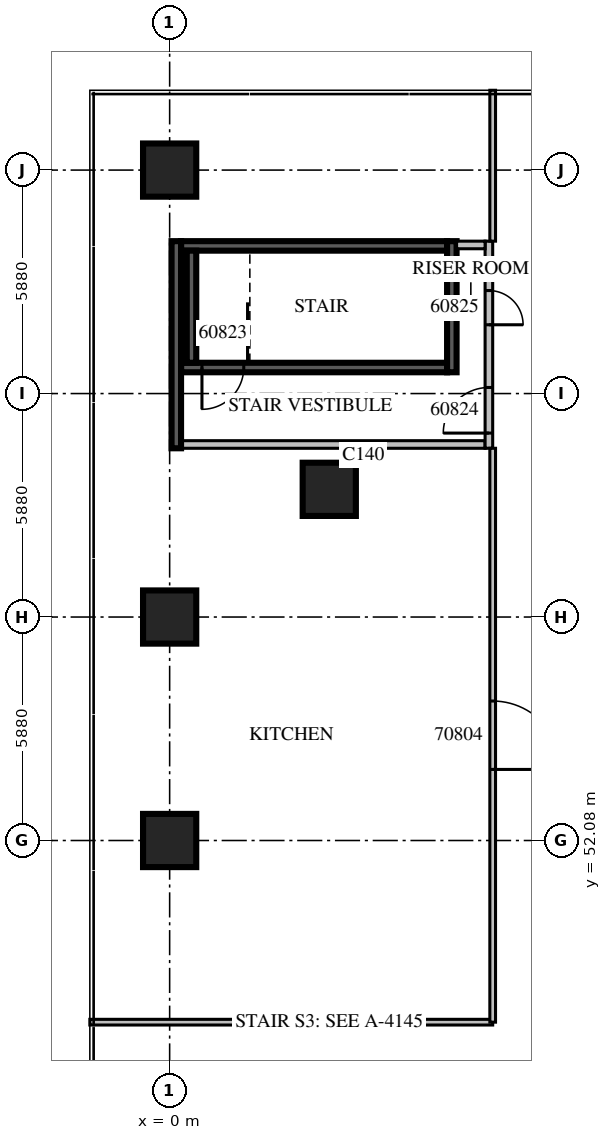
"""IFC4 building model, lengths in metres.
Left out: names, types, materials, properties, quantities, classifications, styles, units other than length and angle.
Written with IfcOpenShell. Run it as: python <this file> out.ifc"""

import sys

from ifc_helpers import new_model, si_unit, direction, frame, frame_2d, origin, origin_2d, place, context, subcontext, project, spatial, rectangle, extrude, source, transform, mapped, element, fill, save


model = new_model("IFC4")
c1 = context("Model", 3, precision=1e-05, world=origin(), true_north=direction((0.0, 1.0)))
c2 = subcontext(c1, "Body", "Model", "MODEL_VIEW")
j1 = project(units=[si_unit("LENGTHUNIT", "METRE"), si_unit("PLANEANGLEUNIT", "RADIAN")], contexts=[c1])
p1 = place(None, origin())
s1 = spatial("IfcSite", under=j1, at=p1, CompositionType="ELEMENT")
p2 = place(p1, origin())
s2 = spatial("IfcBuilding", under=s1, at=p2, CompositionType="ELEMENT")
p3 = place(p2, frame((0.0, 0.0, 29.1)))
s3 = spatial("IfcBuildingStorey", under=s2, at=p3, CompositionType="ELEMENT", Elevation=29.1)
m1 = source(origin(), c2, "Body", "SweptSolid", [
    extrude(rectangle(XDim=1.4, YDim=1.4, at=origin_2d()), origin(), (0.0, 0.0, 1.0), 5.4),
])
for number, where, z_axis, x_axis in (
    (1, (0.0, 52.08, 0.0), (0.0, 0.0, 1.0), (1.0, 0.0, 0.0)),
    (2, (0.0, 57.96, 0.0), (0.0, 0.0, 1.0), (1.0, 0.0, 0.0)),
    (3, (0.0, 69.72, 0.0), (0.0, 0.0, 1.0), (1.0, 0.0, 0.0)),
    (4, (4.2, 61.32, 0.0), (0.0, 0.0, 1.0), (1.0, 0.0, 0.0)),
):
    element("IfcColumn", number, at=place(p3, frame(where, z_axis=z_axis, x_axis=x_axis)), inside=s3, PredefinedType="COLUMN", context=c2, shape_type="MappedRepresentation", body=[
        mapped(m1, transform((0.0, 0.0, 0.0), scale=1.0)),
    ])
m2 = source(origin(), c2, "Body", "SweptSolid", [
    extrude(rectangle(XDim=7.0, YDim=0.25, at=frame_2d((3.5, 0.0))), origin(), (0.0, 0.0, 1.0), 4.8),
])
p4 = place(p3, frame((0.3, 64.525, 0.0), z_axis=(0.0, 0.0, 1.0), x_axis=(1.0, 0.0, 0.0)))
e5 = element("IfcWall", 5, at=p4, inside=s3, PredefinedType="SOLIDWALL", context=c2, shape_type="MappedRepresentation", body=[
    mapped(m2, transform((0.0, 0.0, 0.0), scale=1.0)),
])
m3 = source(origin(), c2, "Body", "SweptSolid", [
    extrude(rectangle(XDim=1.1, YDim=2.1, at=frame_2d((0.55, 1.05))), frame((0.0, 0.135, 0.0), z_axis=(0.0, -1.0, 0.0), x_axis=(1.0, 0.0, 0.0)), (0.0, 0.0, 1.0), 0.27),
])
p5 = place(p4, frame((0.55, 0.0, 0.0)))
e6 = element("IfcOpeningElement", 6, at=p5, cuts=e5, PredefinedType="OPENING", context=c2, shape_type="MappedRepresentation", body=[
    mapped(m3, transform((0.0, 0.0, 0.0), scale=1.0)),
])
p6 = place(p3, frame((0.3, 67.725, 0.0), z_axis=(0.0, 0.0, 1.0), x_axis=(1.0, 0.0, 0.0)))
e7 = element("IfcWall", 7, at=p6, inside=s3, PredefinedType="SOLIDWALL", context=c2, shape_type="MappedRepresentation", body=[
    mapped(m2, transform((0.0, 0.0, 0.0), scale=1.0)),
])
m4 = source(origin(), c2, "Body", "SweptSolid", [
    extrude(rectangle(XDim=3.45, YDim=0.25, at=frame_2d((1.725, 0.0))), origin(), (0.0, 0.0, 1.0), 4.8),
])
p7 = place(p3, frame((7.425, 64.4, 0.0), z_axis=(0.0, 0.0, 1.0), x_axis=(0.0, 1.0, 0.0)))
e8 = element("IfcWall", 8, at=p7, inside=s3, PredefinedType="SOLIDWALL", context=c2, shape_type="MappedRepresentation", body=[
    mapped(m4, transform((0.0, 0.0, 0.0), scale=1.0)),
])
m5 = source(origin(), c2, "Body", "SweptSolid", [
    extrude(rectangle(XDim=2.95, YDim=0.25, at=frame_2d((1.475, 0.0))), origin(), (0.0, 0.0, 1.0), 4.8),
])
p8 = place(p3, frame((0.575, 64.65, 0.0), z_axis=(0.0, 0.0, 1.0), x_axis=(0.0, 1.0, 0.0)))
e9 = element("IfcWall", 9, at=p8, inside=s3, PredefinedType="SOLIDWALL", context=c2, shape_type="MappedRepresentation", body=[
    mapped(m5, transform((0.0, 0.0, 0.0), scale=1.0)),
])
m6 = source(origin(), c2, "Body", "SweptSolid", [
    extrude(rectangle(XDim=8.0, YDim=0.2, at=frame_2d((4.0, 0.0))), origin(), (0.0, 0.0, 1.0), 4.8),
])
p9 = place(p3, frame((0.3, 62.5, 0.0), z_axis=(0.0, 0.0, 1.0), x_axis=(1.0, 0.0, 0.0)))
e10 = element("IfcWall", 10, at=p9, inside=s3, PredefinedType="PARTITIONING", context=c2, shape_type="MappedRepresentation", body=[
    mapped(m6, transform((0.0, 0.0, 0.0), scale=1.0)),
])
m7 = source(origin(), c2, "Body", "SweptSolid", [
    extrude(rectangle(XDim=5.45, YDim=0.2, at=frame_2d((2.725, 0.0))), origin(), (0.0, 0.0, 1.0), 4.8),
])
p10 = place(p3, frame((8.4, 62.4, 0.0), z_axis=(0.0, 0.0, 1.0), x_axis=(0.0, 1.0, 0.0)))
e11 = element("IfcWall", 11, at=p10, inside=s3, PredefinedType="PARTITIONING", context=c2, shape_type="MappedRepresentation", body=[
    mapped(m7, transform((0.0, 0.0, 0.0), scale=1.0)),
])
m8 = source(origin(), c2, "Body", "SweptSolid", [
    extrude(rectangle(XDim=1.2, YDim=2.1, at=frame_2d((0.6, 1.05))), frame((0.0, 0.11, 0.0), z_axis=(0.0, -1.0, 0.0), x_axis=(1.0, 0.0, 0.0)), (0.0, 0.0, 1.0), 0.22),
])
p11 = place(p10, frame((0.4, 0.0, 0.0)))
e12 = element("IfcOpeningElement", 12, at=p11, cuts=e11, PredefinedType="OPENING", context=c2, shape_type="MappedRepresentation", body=[
    mapped(m8, transform((0.0, 0.0, 0.0), scale=1.0)),
])
m9 = source(origin(), c2, "Body", "SweptSolid", [
    extrude(rectangle(XDim=0.9, YDim=2.1, at=frame_2d((0.45, 1.05))), frame((0.0, 0.11, 0.0), z_axis=(0.0, -1.0, 0.0), x_axis=(1.0, 0.0, 0.0)), (0.0, 0.0, 1.0), 0.22),
])
p12 = place(p10, frame((3.25, 0.0, 0.0)))
e13 = element("IfcOpeningElement", 13, at=p12, cuts=e11, PredefinedType="OPENING", context=c2, shape_type="MappedRepresentation", body=[
    mapped(m9, transform((0.0, 0.0, 0.0), scale=1.0)),
])
m10 = source(origin(), c2, "Body", "SweptSolid", [
    extrude(rectangle(XDim=0.75, YDim=0.2, at=frame_2d((0.375, 0.0))), origin(), (0.0, 0.0, 1.0), 4.8),
])
p13 = place(p3, frame((7.55, 67.75, 0.0), z_axis=(0.0, 0.0, 1.0), x_axis=(1.0, 0.0, 0.0)))
e14 = element("IfcWall", 14, at=p13, inside=s3, PredefinedType="PARTITIONING", context=c2, shape_type="MappedRepresentation", body=[
    mapped(m10, transform((0.0, 0.0, 0.0), scale=1.0)),
])
m11 = source(origin(), c2, "Body", "SweptSolid", [
    extrude(rectangle(XDim=5.45, YDim=0.25, at=frame_2d((2.725, 0.0))), origin(), (0.0, 0.0, 1.0), 4.8),
])
p14 = place(p3, frame((0.175, 62.4, 0.0), z_axis=(0.0, 0.0, 1.0), x_axis=(0.0, 1.0, 0.0)))
e15 = element("IfcWall", 15, at=p14, inside=s3, PredefinedType="SOLIDWALL", context=c2, shape_type="MappedRepresentation", body=[
    mapped(m11, transform((0.0, 0.0, 0.0), scale=1.0)),
])
m12 = source(origin(), c2, "Body", "SweptSolid", [
    extrude(rectangle(XDim=10.6, YDim=0.15, at=frame_2d((5.3, 0.0))), origin(), (0.0, 0.0, 1.0), 4.8),
])
p15 = place(p3, frame((-2.1, 47.3, 0.0), z_axis=(0.0, 0.0, 1.0), x_axis=(1.0, 0.0, 0.0)))
e16 = element("IfcWall", 16, at=p15, inside=s3, PredefinedType="PARTITIONING", context=c2, shape_type="MappedRepresentation", body=[
    mapped(m12, transform((0.0, 0.0, 0.0), scale=1.0)),
])
m13 = source(origin(), c2, "Body", "SweptSolid", [
    extrude(rectangle(XDim=15.1, YDim=0.15, at=frame_2d((7.55, 0.0))), origin(), (0.0, 0.0, 1.0), 4.8),
])
p16 = place(p3, frame((8.5, 47.3, 0.0), z_axis=(0.0, 0.0, 1.0), x_axis=(0.0, 1.0, 0.0)))
e17 = element("IfcWall", 17, at=p16, inside=s3, PredefinedType="PARTITIONING", context=c2, shape_type="MappedRepresentation", body=[
    mapped(m13, transform((0.0, 0.0, 0.0), scale=1.0)),
])
m14 = source(origin(), c2, "Body", "SweptSolid", [
    extrude(rectangle(XDim=1.8, YDim=2.1, at=frame_2d((0.9, 1.05))), frame((0.0, 0.085, 0.0), z_axis=(0.0, -1.0, 0.0), x_axis=(1.0, 0.0, 0.0)), (0.0, 0.0, 1.0), 0.17),
])
p17 = place(p16, frame((6.65, 0.0, 0.0)))
e18 = element("IfcOpeningElement", 18, at=p17, cuts=e17, PredefinedType="OPENING", context=c2, shape_type="MappedRepresentation", body=[
    mapped(m14, transform((0.0, 0.0, 0.0), scale=1.0)),
])
m15 = source(origin(), c2, "Body", "SweptSolid", [
    extrude(rectangle(XDim=3.97, YDim=0.15, at=frame_2d((1.985, 0.0))), origin(), (0.0, 0.0, 1.0), 4.8),
])
p18 = place(p3, frame((8.5, 67.85, 0.0), z_axis=(0.0, 0.0, 1.0), x_axis=(0.0, 1.0, 0.0)))
e19 = element("IfcWall", 19, at=p18, inside=s3, PredefinedType="PARTITIONING", context=c2, shape_type="MappedRepresentation", body=[
    mapped(m15, transform((0.0, 0.0, 0.0), scale=1.0)),
])
m16 = source(origin(), c2, "Body", "SweptSolid", [
    extrude(rectangle(XDim=1.1, YDim=2.1, at=frame_2d((0.55, 1.05))), frame((0.0, 0.025, 0.0), z_axis=(0.0, -1.0, 0.0), x_axis=(1.0, 0.0, 0.0)), (0.0, 0.0, 1.0), 0.05),
])
p19 = place(p5, origin())
e20 = element("IfcDoor", 20, at=p19, inside=s3, OperationType="SINGLE_SWING_RIGHT", PredefinedType="DOOR", context=c2, shape_type="MappedRepresentation", body=[
    mapped(m16, transform((0.0, 0.0, 0.0), scale=1.0)),
])
fill(e6, e20)
m17 = source(origin(), c2, "Body", "SweptSolid", [
    extrude(rectangle(XDim=1.2, YDim=2.1, at=frame_2d((0.6, 1.05))), frame((0.0, 0.025, 0.0), z_axis=(0.0, -1.0, 0.0), x_axis=(1.0, 0.0, 0.0)), (0.0, 0.0, 1.0), 0.05),
])
p20 = place(p11, origin())
e21 = element("IfcDoor", 21, at=p20, inside=s3, OperationType="SINGLE_SWING_LEFT", PredefinedType="DOOR", context=c2, shape_type="MappedRepresentation", body=[
    mapped(m17, transform((0.0, 0.0, 0.0), scale=1.0)),
])
fill(e12, e21)
m18 = source(origin(), c2, "Body", "SweptSolid", [
    extrude(rectangle(XDim=0.9, YDim=2.1, at=frame_2d((0.45, 1.05))), frame((0.0, 0.025, 0.0), z_axis=(0.0, -1.0, 0.0), x_axis=(1.0, 0.0, 0.0)), (0.0, 0.0, 1.0), 0.05),
])
p21 = place(p12, origin())
e22 = element("IfcDoor", 22, at=p21, inside=s3, OperationType="SINGLE_SWING_RIGHT", PredefinedType="DOOR", context=c2, shape_type="MappedRepresentation", body=[
    mapped(m18, transform((0.0, 0.0, 0.0), scale=1.0)),
])
fill(e13, e22)
m19 = source(origin(), c2, "Body", "SweptSolid", [
    extrude(rectangle(XDim=1.8, YDim=2.1, at=frame_2d((0.9, 1.05))), frame((0.0, 0.025, 0.0), z_axis=(0.0, -1.0, 0.0), x_axis=(1.0, 0.0, 0.0)), (0.0, 0.0, 1.0), 0.05),
])
p22 = place(p17, origin())
e23 = element("IfcDoor", 23, at=p22, inside=s3, OperationType="DOUBLE_DOOR_SINGLE_SWING", PredefinedType="DOOR", context=c2, shape_type="MappedRepresentation", body=[
    mapped(m19, transform((0.0, 0.0, 0.0), scale=1.0)),
])
fill(e18, e23)
save(model, sys.argv[1])
